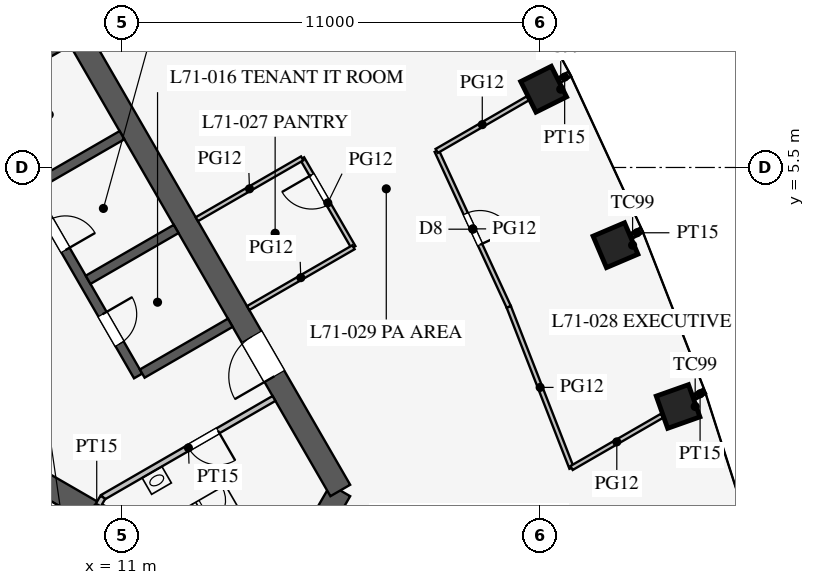
"""IFC4 building model, lengths in metres.
Left out: names, types, materials, properties, quantities, classifications, styles, units other than length and angle.
Written with IfcOpenShell. Run it as: python <this file> out.ifc"""

import sys

from ifc_helpers import new_model, si_unit, direction, frame, frame_2d, origin, origin_2d, place, context, subcontext, project, spatial, rectangle, extrude, element, fill, save


model = new_model("IFC4")
c1 = context("Model", 3, precision=1e-05, world=origin(), true_north=direction((0.0, 1.0)))
c2 = subcontext(c1, "Body", "Model", "MODEL_VIEW")
j1 = project(units=[si_unit("LENGTHUNIT", "METRE"), si_unit("PLANEANGLEUNIT", "RADIAN")], contexts=[c1])
p1 = place(None, origin())
s1 = spatial("IfcSite", under=j1, at=p1, CompositionType="ELEMENT")
p2 = place(p1, origin())
s2 = spatial("IfcBuilding", under=s1, at=p2, CompositionType="ELEMENT")
p3 = place(p2, frame((0.0, 0.0, 309.9)))
s3 = spatial("IfcBuildingStorey", under=s2, at=p3, CompositionType="ELEMENT", Elevation=309.9)
for number, where, z_axis, x_axis in (
    (1, (25.632, -0.79, 0.0), (0.0, 0.0, 1.0), (-0.334, 0.942, 0.0)),
    (2, (23.985, 3.455, 0.0), (0.0, 0.0, 1.0), (-0.391, 0.92, 0.0)),
    (3, (22.094, 7.56, 0.0), (0.0, 0.0, 1.0), (-0.447, 0.895, 0.0)),
):
    element("IfcColumn", number, at=place(p3, frame(where, z_axis=z_axis, x_axis=x_axis)), inside=s3, PredefinedType="COLUMN", context=c2, shape_type="SweptSolid", body=[
        extrude(rectangle(XDim=0.9, YDim=0.9, at=origin_2d()), origin(), (0.0, 0.0, 1.0), 4.2),
    ])
p4 = place(p3, frame((10.97, -13.0, 0.0), z_axis=(0.0, 0.0, 1.0), x_axis=(0.499995765644, 0.866027848477, 0.0)))
e4 = element("IfcWall", 4, at=p4, inside=s3, PredefinedType="SHEAR", context=c2, shape_type="SweptSolid", body=[
    extrude(rectangle(XDim=11.547, YDim=0.6, at=frame_2d((5.773, 0.0))), origin(), (0.0, 0.0, 1.0), 4.2),
])
p5 = place(p3, frame((16.743, -3.0, 0.0), z_axis=(0.0, 0.0, 1.0), x_axis=(-0.500002442456, 0.866023993627, 0.0)))
e5 = element("IfcWall", 5, at=p5, inside=s3, PredefinedType="SHEAR", context=c2, shape_type="SweptSolid", body=[
    extrude(rectangle(XDim=21.939, YDim=0.6, at=frame_2d((10.97, 0.0))), origin(), (0.0, 0.0, 1.0), 4.2),
])
p6 = place(p5, frame((17.27, 0.0, 0.0)))
e6 = element("IfcOpeningElement", 6, at=p6, cuts=e5, PredefinedType="OPENING", context=c2, shape_type="SweptSolid", body=[
    extrude(rectangle(XDim=1.2, YDim=2.1, at=frame_2d((0.6, 1.05))), frame((0.0, 0.31, 0.0), z_axis=(0.0, -1.0, 0.0), x_axis=(1.0, 0.0, 0.0)), (0.0, 0.0, 1.0), 0.62),
])
p7 = place(p5, frame((3.47, 0.0, 0.0)))
e7 = element("IfcOpeningElement", 7, at=p7, cuts=e5, PredefinedType="OPENING", context=c2, shape_type="SweptSolid", body=[
    extrude(rectangle(XDim=1.2, YDim=2.1, at=frame_2d((0.6, 1.05))), frame((0.0, 0.31, 0.0), z_axis=(0.0, -1.0, 0.0), x_axis=(1.0, 0.0, 0.0)), (0.0, 0.0, 1.0), 0.62),
])
p8 = place(p3, frame((11.424, 0.014, 0.0), z_axis=(0.0, 0.0, 1.0), x_axis=(-0.500001763848, 0.866024385424, 0.0)))
e8 = element("IfcWall", 8, at=p8, inside=s3, PredefinedType="SHEAR", context=c2, shape_type="SweptSolid", body=[
    extrude(rectangle(XDim=11.4, YDim=0.25, at=frame_2d((5.7, 0.0))), origin(), (0.0, 0.0, 1.0), 4.2),
])
p9 = place(p8, frame((0.975, 0.0, 0.0)))
e9 = element("IfcOpeningElement", 9, at=p9, cuts=e8, PredefinedType="OPENING", context=c2, shape_type="SweptSolid", body=[
    extrude(rectangle(XDim=0.9, YDim=2.1, at=frame_2d((0.45, 1.05))), frame((0.0, 0.135, 0.0), z_axis=(0.0, -1.0, 0.0), x_axis=(1.0, 0.0, 0.0)), (0.0, 0.0, 1.0), 0.27),
])
p10 = place(p8, frame((3.825, 0.0, 0.0)))
e10 = element("IfcOpeningElement", 10, at=p10, cuts=e8, PredefinedType="OPENING", context=c2, shape_type="SweptSolid", body=[
    extrude(rectangle(XDim=0.9, YDim=2.1, at=frame_2d((0.45, 1.05))), frame((0.0, 0.135, 0.0), z_axis=(0.0, -1.0, 0.0), x_axis=(1.0, 0.0, 0.0)), (0.0, 0.0, 1.0), 0.27),
])
p11 = place(p8, frame((6.675, 0.0, 0.0)))
e11 = element("IfcOpeningElement", 11, at=p11, cuts=e8, PredefinedType="OPENING", context=c2, shape_type="SweptSolid", body=[
    extrude(rectangle(XDim=0.9, YDim=2.1, at=frame_2d((0.45, 1.05))), frame((0.0, 0.135, 0.0), z_axis=(0.0, -1.0, 0.0), x_axis=(1.0, 0.0, 0.0)), (0.0, 0.0, 1.0), 0.27),
])
p12 = place(p8, frame((9.525, 0.0, 0.0)))
e12 = element("IfcOpeningElement", 12, at=p12, cuts=e8, PredefinedType="OPENING", context=c2, shape_type="SweptSolid", body=[
    extrude(rectangle(XDim=0.9, YDim=2.1, at=frame_2d((0.45, 1.05))), frame((0.0, 0.135, 0.0), z_axis=(0.0, -1.0, 0.0), x_axis=(1.0, 0.0, 0.0)), (0.0, 0.0, 1.0), 0.27),
])
for number, where, z_axis, x_axis in (
    (13, (11.532, 0.076, 0.0), (0.0, 0.0, 1.0), (0.866, 0.5, 0.0)),
    (14, (10.107, 2.544, 0.0), (0.0, 0.0, 1.0), (0.866, 0.5, 0.0)),
    (15, (8.682, 5.012, 0.0), (0.0, 0.0, 1.0), (0.866, 0.5, 0.0)),
    (16, (7.257, 7.481, 0.0), (0.0, 0.0, 1.0), (0.866, 0.5, 0.0)),
):
    element("IfcWall", number, at=place(p3, frame(where, z_axis=z_axis, x_axis=x_axis)), inside=s3, PredefinedType="SHEAR", context=c2, shape_type="SweptSolid", body=[
        extrude(rectangle(XDim=2.675, YDim=0.25, at=frame_2d((1.337, 0.0))), origin(), (0.0, 0.0, 1.0), 4.2),
    ])
p13 = place(p3, frame((6.663, -1.509, 0.0), z_axis=(0.0, 0.0, 1.0), x_axis=(0.86603049496, -0.499991181721, 0.0)))
e17 = element("IfcWall", 17, at=p13, inside=s3, PredefinedType="SHEAR", context=c2, shape_type="SweptSolid", body=[
    extrude(rectangle(XDim=9.175, YDim=0.6, at=frame_2d((4.587, 0.0))), origin(), (0.0, 0.0, 1.0), 4.2),
])
p14 = place(p3, frame((10.495, -3.178, 0.0), z_axis=(0.0, 0.0, 1.0), x_axis=(0.866021400173, 0.500006934395, 0.0)))
e18 = element("IfcWall", 18, at=p14, inside=s3, PredefinedType="PARTITIONING", context=c2, shape_type="SweptSolid", body=[
    extrude(rectangle(XDim=5.2, YDim=0.15, at=frame_2d((2.6, 0.0))), origin(), (0.0, 0.0, 1.0), 4.0),
])
p15 = place(p14, frame((2.6, 0.0, 0.0)))
e19 = element("IfcOpeningElement", 19, at=p15, cuts=e18, PredefinedType="OPENING", context=c2, shape_type="SweptSolid", body=[
    extrude(rectangle(XDim=0.9, YDim=2.1, at=frame_2d((0.45, 1.05))), frame((0.0, 0.085, 0.0), z_axis=(0.0, -1.0, 0.0), x_axis=(1.0, 0.0, 0.0)), (0.0, 0.0, 1.0), 0.17),
])
p16 = place(p3, frame((10.495, -3.178, 0.0), z_axis=(0.0, 0.0, 1.0), x_axis=(-0.499842556608, -0.866116284689, 0.0)))
e20 = element("IfcWall", 20, at=p16, inside=s3, PredefinedType="PARTITIONING", context=c2, shape_type="SweptSolid", body=[
    extrude(rectangle(XDim=0.645, YDim=0.15, at=frame_2d((0.323, 0.0))), origin(), (0.0, 0.0, 1.0), 4.0),
])
p17 = place(p3, frame((17.089, 3.4, 0.0), z_axis=(0.0, 0.0, 1.0), x_axis=(-0.4999416173, 0.866059108428, 0.0)))
e21 = element("IfcWall", 21, at=p17, inside=s3, PredefinedType="PARTITIONING", context=c2, shape_type="SweptSolid", body=[
    extrude(rectangle(XDim=2.7, YDim=0.12, at=frame_2d((1.35, 0.0))), origin(), (0.0, 0.0, 1.0), 2.9),
])
p18 = place(p17, frame((1.3, 0.0, 0.15)))
e22 = element("IfcOpeningElement", 22, at=p18, cuts=e21, PredefinedType="OPENING", context=c2, shape_type="SweptSolid", body=[
    extrude(rectangle(XDim=0.9, YDim=2.1, at=frame_2d((0.45, 1.05))), frame((0.0, 0.07, 0.0), z_axis=(0.0, -1.0, 0.0), x_axis=(1.0, 0.0, 0.0)), (0.0, 0.0, 1.0), 0.14),
])
p19 = place(p3, frame((12.968, 4.138, 0.0), z_axis=(0.0, 0.0, 1.0), x_axis=(0.866028054938, 0.499995408039, 0.0)))
e23 = element("IfcWall", 23, at=p19, inside=s3, PredefinedType="PARTITIONING", context=c2, shape_type="SweptSolid", body=[
    extrude(rectangle(XDim=3.2, YDim=0.12, at=frame_2d((1.6, 0.0))), origin(), (0.0, 0.0, 1.0), 2.9),
])
p20 = place(p3, frame((14.318, 1.8, 0.0), z_axis=(0.0, 0.0, 1.0), x_axis=(0.866042017984, 0.499971222258, 0.0)))
e24 = element("IfcWall", 24, at=p20, inside=s3, PredefinedType="PARTITIONING", context=c2, shape_type="SweptSolid", body=[
    extrude(rectangle(XDim=3.2, YDim=0.12, at=frame_2d((1.6, 0.0))), origin(), (0.0, 0.0, 1.0), 2.9),
])
p21 = place(p3, frame((26.089, -0.526, 0.0), z_axis=(0.0, 0.0, 1.0), x_axis=(0.865982457891, 0.500074377092, 0.0)))
e25 = element("IfcWall", 25, at=p21, inside=s3, PredefinedType="PARTITIONING", context=c2, shape_type="SweptSolid", body=[
    extrude(rectangle(XDim=0.28, YDim=0.15, at=frame_2d((0.14, 0.0))), origin(), (0.0, 0.0, 1.0), 2.9),
])
p22 = place(p3, frame((22.51, 7.8, 0.0), z_axis=(0.0, 0.0, 1.0), x_axis=(0.866095534226, 0.499878510834, 0.0)))
e26 = element("IfcWall", 26, at=p22, inside=s3, PredefinedType="PARTITIONING", context=c2, shape_type="SweptSolid", body=[
    extrude(rectangle(XDim=0.316, YDim=0.15, at=frame_2d((0.158, 0.0))), origin(), (0.0, 0.0, 1.0), 2.9),
])
p23 = place(p3, frame((24.422, 3.708, 0.0), z_axis=(0.0, 0.0, 1.0), x_axis=(0.866254317358, 0.499603300288, 0.0)))
e27 = element("IfcWall", 27, at=p23, inside=s3, PredefinedType="PARTITIONING", context=c2, shape_type="SweptSolid", body=[
    extrude(rectangle(XDim=0.296, YDim=0.15, at=frame_2d((0.148, 0.0))), origin(), (0.0, 0.0, 1.0), 2.9),
])
p24 = place(p3, frame((22.829, -2.408, 0.0), z_axis=(0.0, 0.0, 1.0), x_axis=(-0.363230297573, 0.931699388711, 0.0)))
e28 = element("IfcWall", 28, at=p24, inside=s3, PredefinedType="PARTITIONING", context=c2, shape_type="SweptSolid", body=[
    extrude(rectangle(XDim=4.552, YDim=0.12, at=frame_2d((2.276, 0.0))), origin(), (0.0, 0.0, 1.0), 2.9),
])
p25 = place(p3, frame((21.175, 1.833, 0.0), z_axis=(0.0, 0.0, 1.0), x_axis=(-0.419270595022, 0.907861315483, 0.0)))
e29 = element("IfcWall", 29, at=p25, inside=s3, PredefinedType="PARTITIONING", context=c2, shape_type="SweptSolid", body=[
    extrude(rectangle(XDim=4.519, YDim=0.12, at=frame_2d((2.259, 0.0))), origin(), (0.0, 0.0, 1.0), 2.9),
])
p26 = place(p25, frame((1.8, 0.0, 0.15)))
e30 = element("IfcOpeningElement", 30, at=p26, cuts=e29, PredefinedType="OPENING", context=c2, shape_type="SweptSolid", body=[
    extrude(rectangle(XDim=0.9, YDim=2.1, at=frame_2d((0.45, 1.05))), frame((0.0, 0.07, 0.0), z_axis=(0.0, -1.0, 0.0), x_axis=(1.0, 0.0, 0.0)), (0.0, 0.0, 1.0), 0.14),
])
p27 = place(p3, frame((22.829, -2.408, 0.0), z_axis=(0.0, 0.0, 1.0), x_axis=(0.866031754707, 0.499988999718, 0.0)))
e31 = element("IfcWall", 31, at=p27, inside=s3, PredefinedType="PARTITIONING", context=c2, shape_type="SweptSolid", body=[
    extrude(rectangle(XDim=2.749, YDim=0.12, at=frame_2d((1.374, 0.0))), origin(), (0.0, 0.0, 1.0), 2.9),
])
p28 = place(p3, frame((19.281, 5.936, 0.0), z_axis=(0.0, 0.0, 1.0), x_axis=(0.866019581949, 0.500010083578, 0.0)))
e32 = element("IfcWall", 32, at=p28, inside=s3, PredefinedType="PARTITIONING", context=c2, shape_type="SweptSolid", body=[
    extrude(rectangle(XDim=2.768, YDim=0.12, at=frame_2d((1.384, 0.0))), origin(), (0.0, 0.0, 1.0), 2.9),
])
p29 = place(p15, frame((0.9, 0.0, 0.0), z_axis=(0.0, 0.0, 1.0), x_axis=(-1.0, 0.0, 0.0)))
e33 = element("IfcDoor", 33, at=p29, inside=s3, OperationType="SINGLE_SWING_LEFT", PredefinedType="DOOR", context=c2, shape_type="SweptSolid", body=[
    extrude(rectangle(XDim=0.9, YDim=2.1, at=frame_2d((0.45, 1.05))), frame((0.0, 0.025, 0.0), z_axis=(0.0, -1.0, 0.0), x_axis=(1.0, 0.0, 0.0)), (0.0, 0.0, 1.0), 0.05),
])
fill(e19, e33)
p30 = place(p7, origin())
e34 = element("IfcDoor", 34, at=p30, inside=s3, OperationType="SINGLE_SWING_LEFT", PredefinedType="DOOR", context=c2, shape_type="SweptSolid", body=[
    extrude(rectangle(XDim=1.2, YDim=2.1, at=frame_2d((0.6, 1.05))), frame((0.0, 0.025, 0.0), z_axis=(0.0, -1.0, 0.0), x_axis=(1.0, 0.0, 0.0)), (0.0, 0.0, 1.0), 0.05),
])
fill(e7, e34)
p31 = place(p9, frame((0.9, 0.0, 0.0), z_axis=(0.0, 0.0, 1.0), x_axis=(-1.0, 0.0, 0.0)))
e35 = element("IfcDoor", 35, at=p31, inside=s3, OperationType="SINGLE_SWING_LEFT", PredefinedType="DOOR", context=c2, shape_type="SweptSolid", body=[
    extrude(rectangle(XDim=0.9, YDim=2.1, at=frame_2d((0.45, 1.05))), frame((0.0, 0.025, 0.0), z_axis=(0.0, -1.0, 0.0), x_axis=(1.0, 0.0, 0.0)), (0.0, 0.0, 1.0), 0.05),
])
fill(e9, e35)
p32 = place(p10, frame((0.9, 0.0, 0.0), z_axis=(0.0, 0.0, 1.0), x_axis=(-1.0, 0.0, 0.0)))
e36 = element("IfcDoor", 36, at=p32, inside=s3, OperationType="SINGLE_SWING_RIGHT", PredefinedType="DOOR", context=c2, shape_type="SweptSolid", body=[
    extrude(rectangle(XDim=0.9, YDim=2.1, at=frame_2d((0.45, 1.05))), frame((0.0, 0.025, 0.0), z_axis=(0.0, -1.0, 0.0), x_axis=(1.0, 0.0, 0.0)), (0.0, 0.0, 1.0), 0.05),
])
fill(e10, e36)
p33 = place(p18, origin())
e37 = element("IfcDoor", 37, at=p33, inside=s3, OperationType="SINGLE_SWING_RIGHT", PredefinedType="DOOR", context=c2, shape_type="SweptSolid", body=[
    extrude(rectangle(XDim=0.9, YDim=2.1, at=frame_2d((0.45, 1.05))), frame((0.0, 0.025, 0.0), z_axis=(0.0, -1.0, 0.0), x_axis=(1.0, 0.0, 0.0)), (0.0, 0.0, 1.0), 0.05),
])
fill(e22, e37)
p34 = place(p26, frame((0.9, 0.0, 0.0), z_axis=(0.0, 0.0, 1.0), x_axis=(-1.0, 0.0, 0.0)))
e38 = element("IfcDoor", 38, at=p34, inside=s3, OperationType="SINGLE_SWING_RIGHT", PredefinedType="DOOR", context=c2, shape_type="SweptSolid", body=[
    extrude(rectangle(XDim=0.9, YDim=2.1, at=frame_2d((0.45, 1.05))), frame((0.0, 0.025, 0.0), z_axis=(0.0, -1.0, 0.0), x_axis=(1.0, 0.0, 0.0)), (0.0, 0.0, 1.0), 0.05),
])
fill(e30, e38)
save(model, sys.argv[1])
